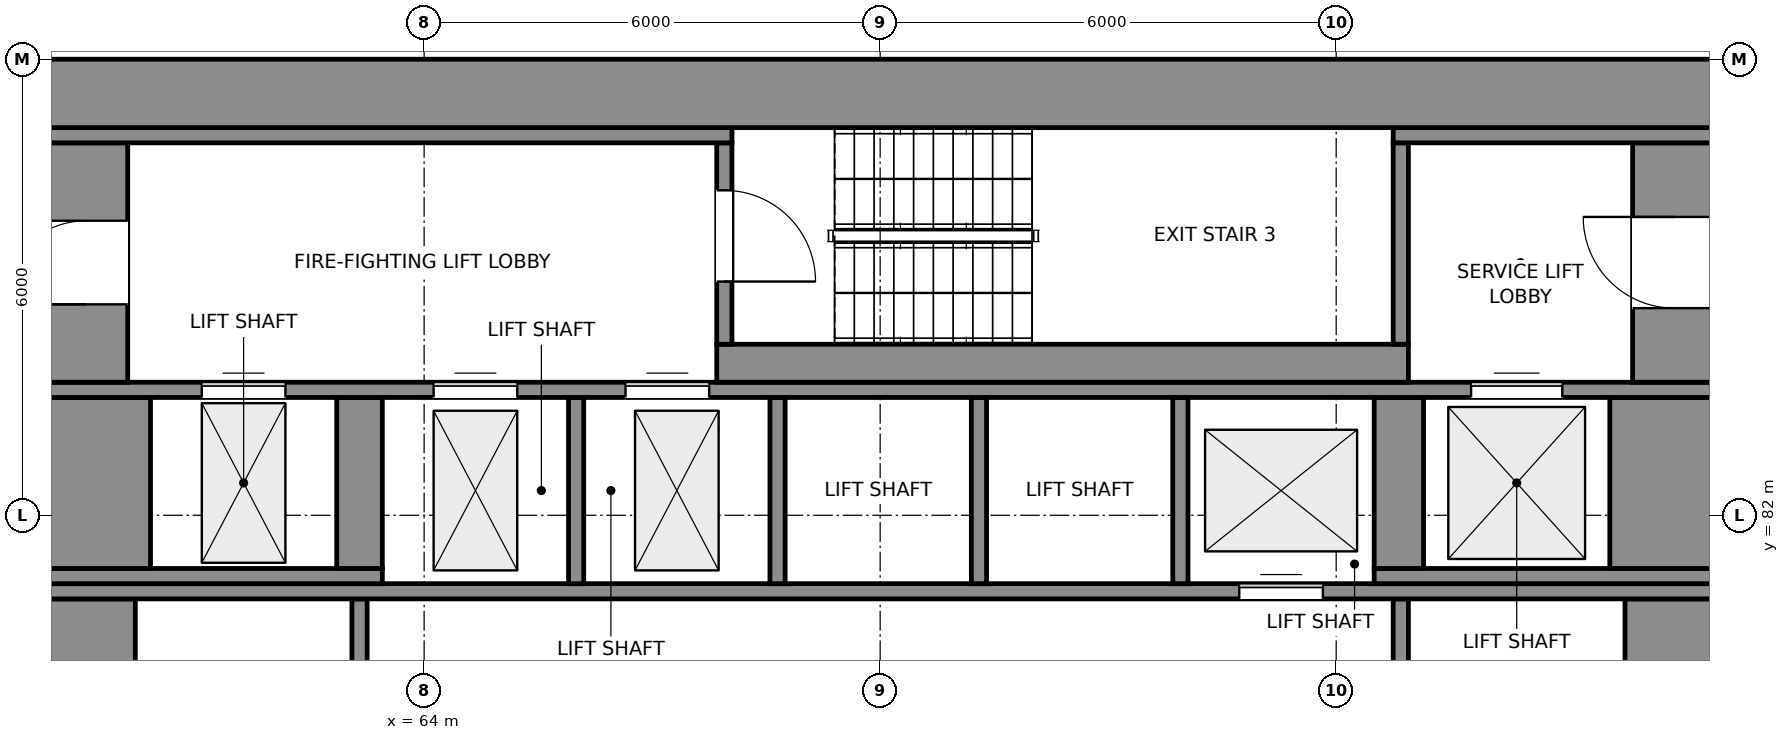
"""IFC4 building model, lengths in metres.
Left out: names, types, materials, properties, quantities, classifications, styles, units other than length and angle.
Written with IfcOpenShell. Run it as: python <this file> out.ifc"""

import sys

from ifc_helpers import new_model, si_unit, direction, frame, frame_2d, origin, place, context, subcontext, project, spatial, rectangle, extrude, element, fill, save


model = new_model("IFC4")
c1 = context("Model", 3, precision=1e-05, world=origin(), true_north=direction((0.0, 1.0)))
c2 = subcontext(c1, "Body", "Model", "MODEL_VIEW")
j1 = project(units=[si_unit("LENGTHUNIT", "METRE"), si_unit("PLANEANGLEUNIT", "RADIAN")], contexts=[c1])
p1 = place(None, origin())
s1 = spatial("IfcSite", under=j1, at=p1, CompositionType="ELEMENT")
p2 = place(p1, origin())
s2 = spatial("IfcBuilding", under=s1, at=p2, CompositionType="ELEMENT")
p3 = place(p2, frame((0.0, 0.0, 98.6)))
s3 = spatial("IfcBuildingStorey", under=s2, at=p3, CompositionType="ELEMENT", Elevation=98.6)
for number, where, z_axis, x_axis in (
    (1, (59.6, 72.1, 0.0), (0.0, 0.0, 1.0), (0.0, 1.0, 0.0)),
    (2, (80.4, 72.1, 0.0), (0.0, 0.0, 1.0), (0.0, 1.0, 0.0)),
):
    element("IfcWall", number, at=place(p3, frame(where, z_axis=z_axis, x_axis=x_axis)), inside=s3, PredefinedType="SHEAR", context=c2, shape_type="SweptSolid", body=[
        extrude(rectangle(XDim=8.8, YDim=1.2, at=frame_2d((4.4, 0.0))), origin(), (0.0, 0.0, 1.0), 3.9),
    ])
for number, where, z_axis, x_axis in (
    (3, (63.15, 77.7, 0.0), (0.0, 0.0, 1.0), (0.0, 1.0, 0.0)),
    (4, (76.85, 77.7, 0.0), (0.0, 0.0, 1.0), (0.0, 1.0, 0.0)),
):
    element("IfcWall", number, at=place(p3, frame(where, z_axis=z_axis, x_axis=x_axis)), inside=s3, PredefinedType="SHEAR", context=c2, shape_type="SweptSolid", body=[
        extrude(rectangle(XDim=3.2, YDim=0.2, at=frame_2d((1.6, 0.0))), origin(), (0.0, 0.0, 1.0), 3.9),
    ])
p4 = place(p3, frame((59.0, 81.0, 0.0), z_axis=(0.0, 0.0, 1.0), x_axis=(1.0, 0.0, 0.0)))
e5 = element("IfcWall", 5, at=p4, inside=s3, PredefinedType="SHEAR", context=c2, shape_type="SweptSolid", body=[
    extrude(rectangle(XDim=22.0, YDim=0.2, at=frame_2d((11.0, 0.0))), origin(), (0.0, 0.0, 1.0), 3.9),
])
p5 = place(p4, frame((15.725, 0.0, 0.0)))
e6 = element("IfcOpeningElement", 6, at=p5, cuts=e5, PredefinedType="OPENING", context=c2, shape_type="SweptSolid", body=[
    extrude(rectangle(XDim=1.1, YDim=2.1, at=frame_2d((0.55, 1.05))), frame((0.0, 0.11, 0.0), z_axis=(0.0, -1.0, 0.0), x_axis=(1.0, 0.0, 0.0)), (0.0, 0.0, 1.0), 0.22),
])
p6 = place(p3, frame((59.0, 81.2, 0.0), z_axis=(0.0, 0.0, 1.0), x_axis=(1.0, 0.0, 0.0)))
e7 = element("IfcWall", 7, at=p6, inside=s3, PredefinedType="SHEAR", context=c2, shape_type="SweptSolid", body=[
    extrude(rectangle(XDim=4.45, YDim=0.2, at=frame_2d((2.225, 0.0))), origin(), (0.0, 0.0, 1.0), 3.9),
])
for number, where, z_axis, x_axis in (
    (8, (66.0, 81.1, 0.0), (0.0, 0.0, 1.0), (0.0, 1.0, 0.0)),
    (9, (68.65, 81.1, 0.0), (0.0, 0.0, 1.0), (0.0, 1.0, 0.0)),
    (10, (71.3, 81.1, 0.0), (0.0, 0.0, 1.0), (0.0, 1.0, 0.0)),
    (11, (73.95, 81.1, 0.0), (0.0, 0.0, 1.0), (0.0, 1.0, 0.0)),
):
    element("IfcWall", number, at=place(p3, frame(where, z_axis=z_axis, x_axis=x_axis)), inside=s3, PredefinedType="SHEAR", context=c2, shape_type="SweptSolid", body=[
        extrude(rectangle(XDim=2.45, YDim=0.2, at=frame_2d((1.225, 0.0))), origin(), (0.0, 0.0, 1.0), 3.9),
    ])
p7 = place(p3, frame((76.5, 81.2, 0.0), z_axis=(0.0, 0.0, 1.0), x_axis=(1.0, 0.0, 0.0)))
e12 = element("IfcWall", 12, at=p7, inside=s3, PredefinedType="SHEAR", context=c2, shape_type="SweptSolid", body=[
    extrude(rectangle(XDim=4.5, YDim=0.2, at=frame_2d((2.25, 0.0))), origin(), (0.0, 0.0, 1.0), 3.9),
])
p8 = place(p3, frame((59.7, 81.3, 0.0), z_axis=(0.0, 0.0, 1.0), x_axis=(0.0, 1.0, 0.0)))
e13 = element("IfcWall", 13, at=p8, inside=s3, PredefinedType="SHEAR", context=c2, shape_type="SweptSolid", body=[
    extrude(rectangle(XDim=2.25, YDim=1.4, at=frame_2d((1.125, 0.0))), origin(), (0.0, 0.0, 1.0), 3.9),
])
p9 = place(p3, frame((63.15, 81.3, 0.0), z_axis=(0.0, 0.0, 1.0), x_axis=(0.0, 1.0, 0.0)))
e14 = element("IfcWall", 14, at=p9, inside=s3, PredefinedType="SHEAR", context=c2, shape_type="SweptSolid", body=[
    extrude(rectangle(XDim=2.25, YDim=0.6, at=frame_2d((1.125, 0.0))), origin(), (0.0, 0.0, 1.0), 3.9),
])
p10 = place(p3, frame((76.825, 81.3, 0.0), z_axis=(0.0, 0.0, 1.0), x_axis=(0.0, 1.0, 0.0)))
e15 = element("IfcWall", 15, at=p10, inside=s3, PredefinedType="SHEAR", context=c2, shape_type="SweptSolid", body=[
    extrude(rectangle(XDim=2.25, YDim=0.65, at=frame_2d((1.125, 0.0))), origin(), (0.0, 0.0, 1.0), 3.9),
])
p11 = place(p3, frame((80.3, 81.3, 0.0), z_axis=(0.0, 0.0, 1.0), x_axis=(0.0, 1.0, 0.0)))
e16 = element("IfcWall", 16, at=p11, inside=s3, PredefinedType="SHEAR", context=c2, shape_type="SweptSolid", body=[
    extrude(rectangle(XDim=2.25, YDim=1.4, at=frame_2d((1.125, 0.0))), origin(), (0.0, 0.0, 1.0), 3.9),
])
p12 = place(p3, frame((59.0, 83.65, 0.0), z_axis=(0.0, 0.0, 1.0), x_axis=(1.0, 0.0, 0.0)))
e17 = element("IfcWall", 17, at=p12, inside=s3, PredefinedType="SHEAR", context=c2, shape_type="SweptSolid", body=[
    extrude(rectangle(XDim=22.0, YDim=0.2, at=frame_2d((11.0, 0.0))), origin(), (0.0, 0.0, 1.0), 3.9),
])
p13 = place(p12, frame((5.125, 0.0, 0.0)))
e18 = element("IfcOpeningElement", 18, at=p13, cuts=e17, PredefinedType="OPENING", context=c2, shape_type="SweptSolid", body=[
    extrude(rectangle(XDim=1.1, YDim=2.1, at=frame_2d((0.55, 1.05))), frame((0.0, 0.11, 0.0), z_axis=(0.0, -1.0, 0.0), x_axis=(1.0, 0.0, 0.0)), (0.0, 0.0, 1.0), 0.22),
])
p14 = place(p12, frame((7.65, 0.0, 0.0)))
e19 = element("IfcOpeningElement", 19, at=p14, cuts=e17, PredefinedType="OPENING", context=c2, shape_type="SweptSolid", body=[
    extrude(rectangle(XDim=1.1, YDim=2.1, at=frame_2d((0.55, 1.05))), frame((0.0, 0.11, 0.0), z_axis=(0.0, -1.0, 0.0), x_axis=(1.0, 0.0, 0.0)), (0.0, 0.0, 1.0), 0.22),
])
p15 = place(p12, frame((18.775, 0.0, 0.0)))
e20 = element("IfcOpeningElement", 20, at=p15, cuts=e17, PredefinedType="OPENING", context=c2, shape_type="SweptSolid", body=[
    extrude(rectangle(XDim=1.2, YDim=2.1, at=frame_2d((0.6, 1.05))), frame((0.0, 0.11, 0.0), z_axis=(0.0, -1.0, 0.0), x_axis=(1.0, 0.0, 0.0)), (0.0, 0.0, 1.0), 0.22),
])
p16 = place(p12, frame((2.075, 0.0, 0.0)))
e21 = element("IfcOpeningElement", 21, at=p16, cuts=e17, PredefinedType="OPENING", context=c2, shape_type="SweptSolid", body=[
    extrude(rectangle(XDim=1.1, YDim=2.1, at=frame_2d((0.55, 1.05))), frame((0.0, 0.11, 0.0), z_axis=(0.0, -1.0, 0.0), x_axis=(1.0, 0.0, 0.0)), (0.0, 0.0, 1.0), 0.22),
])
p17 = place(p3, frame((59.55, 83.75, 0.0), z_axis=(0.0, 0.0, 1.0), x_axis=(0.0, 1.0, 0.0)))
e22 = element("IfcWall", 22, at=p17, inside=s3, PredefinedType="SHEAR", context=c2, shape_type="SweptSolid", body=[
    extrude(rectangle(XDim=3.15, YDim=1.1, at=frame_2d((1.575, 0.0))), origin(), (0.0, 0.0, 1.0), 3.9),
])
p18 = place(p17, frame((1.025, 0.0, 0.0)))
e23 = element("IfcOpeningElement", 23, at=p18, cuts=e22, PredefinedType="OPENING", context=c2, shape_type="SweptSolid", body=[
    extrude(rectangle(XDim=1.1, YDim=2.1, at=frame_2d((0.55, 1.05))), frame((0.0, 0.56, 0.0), z_axis=(0.0, -1.0, 0.0), x_axis=(1.0, 0.0, 0.0)), (0.0, 0.0, 1.0), 1.12),
])
p19 = place(p3, frame((67.85, 84.0, 0.0), z_axis=(0.0, 0.0, 1.0), x_axis=(1.0, 0.0, 0.0)))
e24 = element("IfcWall", 24, at=p19, inside=s3, PredefinedType="SHEAR", context=c2, shape_type="SweptSolid", body=[
    extrude(rectangle(XDim=9.1, YDim=0.5, at=frame_2d((4.55, 0.0))), origin(), (0.0, 0.0, 1.0), 3.9),
])
p20 = place(p3, frame((80.45, 83.75, 0.0), z_axis=(0.0, 0.0, 1.0), x_axis=(0.0, 1.0, 0.0)))
e25 = element("IfcWall", 25, at=p20, inside=s3, PredefinedType="SHEAR", context=c2, shape_type="SweptSolid", body=[
    extrude(rectangle(XDim=3.15, YDim=1.1, at=frame_2d((1.575, 0.0))), origin(), (0.0, 0.0, 1.0), 3.9),
])
p21 = place(p20, frame((0.975, 0.0, 0.0)))
e26 = element("IfcOpeningElement", 26, at=p21, cuts=e25, PredefinedType="OPENING", context=c2, shape_type="SweptSolid", body=[
    extrude(rectangle(XDim=1.2, YDim=2.1, at=frame_2d((0.6, 1.05))), frame((0.0, 0.56, 0.0), z_axis=(0.0, -1.0, 0.0), x_axis=(1.0, 0.0, 0.0)), (0.0, 0.0, 1.0), 1.12),
])
p22 = place(p3, frame((67.95, 84.25, 0.0), z_axis=(0.0, 0.0, 1.0), x_axis=(0.0, 1.0, 0.0)))
e27 = element("IfcWall", 27, at=p22, inside=s3, PredefinedType="SHEAR", context=c2, shape_type="SweptSolid", body=[
    extrude(rectangle(XDim=2.65, YDim=0.2, at=frame_2d((1.325, 0.0))), origin(), (0.0, 0.0, 1.0), 3.9),
])
p23 = place(p22, frame((0.825, 0.0, 0.0)))
e28 = element("IfcOpeningElement", 28, at=p23, cuts=e27, PredefinedType="OPENING", context=c2, shape_type="SweptSolid", body=[
    extrude(rectangle(XDim=1.2, YDim=2.1, at=frame_2d((0.6, 1.05))), frame((0.0, 0.11, 0.0), z_axis=(0.0, -1.0, 0.0), x_axis=(1.0, 0.0, 0.0)), (0.0, 0.0, 1.0), 0.22),
])
p24 = place(p3, frame((76.85, 84.25, 0.0), z_axis=(0.0, 0.0, 1.0), x_axis=(0.0, 1.0, 0.0)))
e29 = element("IfcWall", 29, at=p24, inside=s3, PredefinedType="SHEAR", context=c2, shape_type="SweptSolid", body=[
    extrude(rectangle(XDim=2.65, YDim=0.2, at=frame_2d((1.325, 0.0))), origin(), (0.0, 0.0, 1.0), 3.9),
])
p25 = place(p3, frame((59.0, 87.0, 0.0), z_axis=(0.0, 0.0, 1.0), x_axis=(1.0, 0.0, 0.0)))
e30 = element("IfcWall", 30, at=p25, inside=s3, PredefinedType="SHEAR", context=c2, shape_type="SweptSolid", body=[
    extrude(rectangle(XDim=9.05, YDim=0.2, at=frame_2d((4.525, 0.0))), origin(), (0.0, 0.0, 1.0), 3.9),
])
p26 = place(p3, frame((76.75, 87.0, 0.0), z_axis=(0.0, 0.0, 1.0), x_axis=(1.0, 0.0, 0.0)))
e31 = element("IfcWall", 31, at=p26, inside=s3, PredefinedType="SHEAR", context=c2, shape_type="SweptSolid", body=[
    extrude(rectangle(XDim=4.25, YDim=0.2, at=frame_2d((2.125, 0.0))), origin(), (0.0, 0.0, 1.0), 3.9),
])
p27 = place(p3, frame((59.0, 87.55, 0.0), z_axis=(0.0, 0.0, 1.0), x_axis=(1.0, 0.0, 0.0)))
e32 = element("IfcWall", 32, at=p27, inside=s3, PredefinedType="SHEAR", context=c2, shape_type="SweptSolid", body=[
    extrude(rectangle(XDim=22.0, YDim=0.9, at=frame_2d((11.0, 0.0))), origin(), (0.0, 0.0, 1.0), 3.9),
])
p28 = place(p23, frame((1.2, 0.0, 0.0), z_axis=(0.0, 0.0, 1.0), x_axis=(-1.0, 0.0, 0.0)))
e33 = element("IfcDoor", 33, at=p28, inside=s3, OperationType="SINGLE_SWING_RIGHT", PredefinedType="DOOR", context=c2, shape_type="SweptSolid", body=[
    extrude(rectangle(XDim=1.2, YDim=2.1, at=frame_2d((0.6, 1.05))), frame((0.0, 0.025, 0.0), z_axis=(0.0, -1.0, 0.0), x_axis=(1.0, 0.0, 0.0)), (0.0, 0.0, 1.0), 0.05),
])
fill(e28, e33)
p29 = place(p18, origin())
e34 = element("IfcDoor", 34, at=p29, inside=s3, OperationType="SINGLE_SWING_LEFT", PredefinedType="DOOR", context=c2, shape_type="SweptSolid", body=[
    extrude(rectangle(XDim=1.1, YDim=2.1, at=frame_2d((0.55, 1.05))), frame((0.0, 0.025, 0.0), z_axis=(0.0, -1.0, 0.0), x_axis=(1.0, 0.0, 0.0)), (0.0, 0.0, 1.0), 0.05),
])
fill(e23, e34)
p30 = place(p21, origin())
e35 = element("IfcDoor", 35, at=p30, inside=s3, OperationType="SINGLE_SWING_RIGHT", PredefinedType="DOOR", context=c2, shape_type="SweptSolid", body=[
    extrude(rectangle(XDim=1.2, YDim=2.1, at=frame_2d((0.6, 1.05))), frame((0.0, 0.025, 0.0), z_axis=(0.0, -1.0, 0.0), x_axis=(1.0, 0.0, 0.0)), (0.0, 0.0, 1.0), 0.05),
])
fill(e26, e35)
p31 = place(p13, origin())
e36 = element("IfcDoor", 36, at=p31, inside=s3, OperationType="DOUBLE_DOOR_SLIDING", PredefinedType="DOOR", context=c2, shape_type="SweptSolid", body=[
    extrude(rectangle(XDim=1.1, YDim=2.1, at=frame_2d((0.55, 1.05))), frame((0.0, 0.025, 0.0), z_axis=(0.0, -1.0, 0.0), x_axis=(1.0, 0.0, 0.0)), (0.0, 0.0, 1.0), 0.05),
])
fill(e18, e36)
p32 = place(p14, origin())
e37 = element("IfcDoor", 37, at=p32, inside=s3, OperationType="DOUBLE_DOOR_SLIDING", PredefinedType="DOOR", context=c2, shape_type="SweptSolid", body=[
    extrude(rectangle(XDim=1.1, YDim=2.1, at=frame_2d((0.55, 1.05))), frame((0.0, 0.025, 0.0), z_axis=(0.0, -1.0, 0.0), x_axis=(1.0, 0.0, 0.0)), (0.0, 0.0, 1.0), 0.05),
])
fill(e19, e37)
p33 = place(p5, origin())
e38 = element("IfcDoor", 38, at=p33, inside=s3, OperationType="DOUBLE_DOOR_SLIDING", PredefinedType="DOOR", context=c2, shape_type="SweptSolid", body=[
    extrude(rectangle(XDim=1.1, YDim=2.1, at=frame_2d((0.55, 1.05))), frame((0.0, 0.025, 0.0), z_axis=(0.0, -1.0, 0.0), x_axis=(1.0, 0.0, 0.0)), (0.0, 0.0, 1.0), 0.05),
])
fill(e6, e38)
p34 = place(p15, origin())
e39 = element("IfcDoor", 39, at=p34, inside=s3, OperationType="DOUBLE_DOOR_SLIDING", PredefinedType="DOOR", context=c2, shape_type="SweptSolid", body=[
    extrude(rectangle(XDim=1.2, YDim=2.1, at=frame_2d((0.6, 1.05))), frame((0.0, 0.025, 0.0), z_axis=(0.0, -1.0, 0.0), x_axis=(1.0, 0.0, 0.0)), (0.0, 0.0, 1.0), 0.05),
])
fill(e20, e39)
p35 = place(p16, origin())
e40 = element("IfcDoor", 40, at=p35, inside=s3, OperationType="DOUBLE_DOOR_SLIDING", PredefinedType="DOOR", context=c2, shape_type="SweptSolid", body=[
    extrude(rectangle(XDim=1.1, YDim=2.1, at=frame_2d((0.55, 1.05))), frame((0.0, 0.025, 0.0), z_axis=(0.0, -1.0, 0.0), x_axis=(1.0, 0.0, 0.0)), (0.0, 0.0, 1.0), 0.05),
])
fill(e21, e40)
save(model, sys.argv[1])
